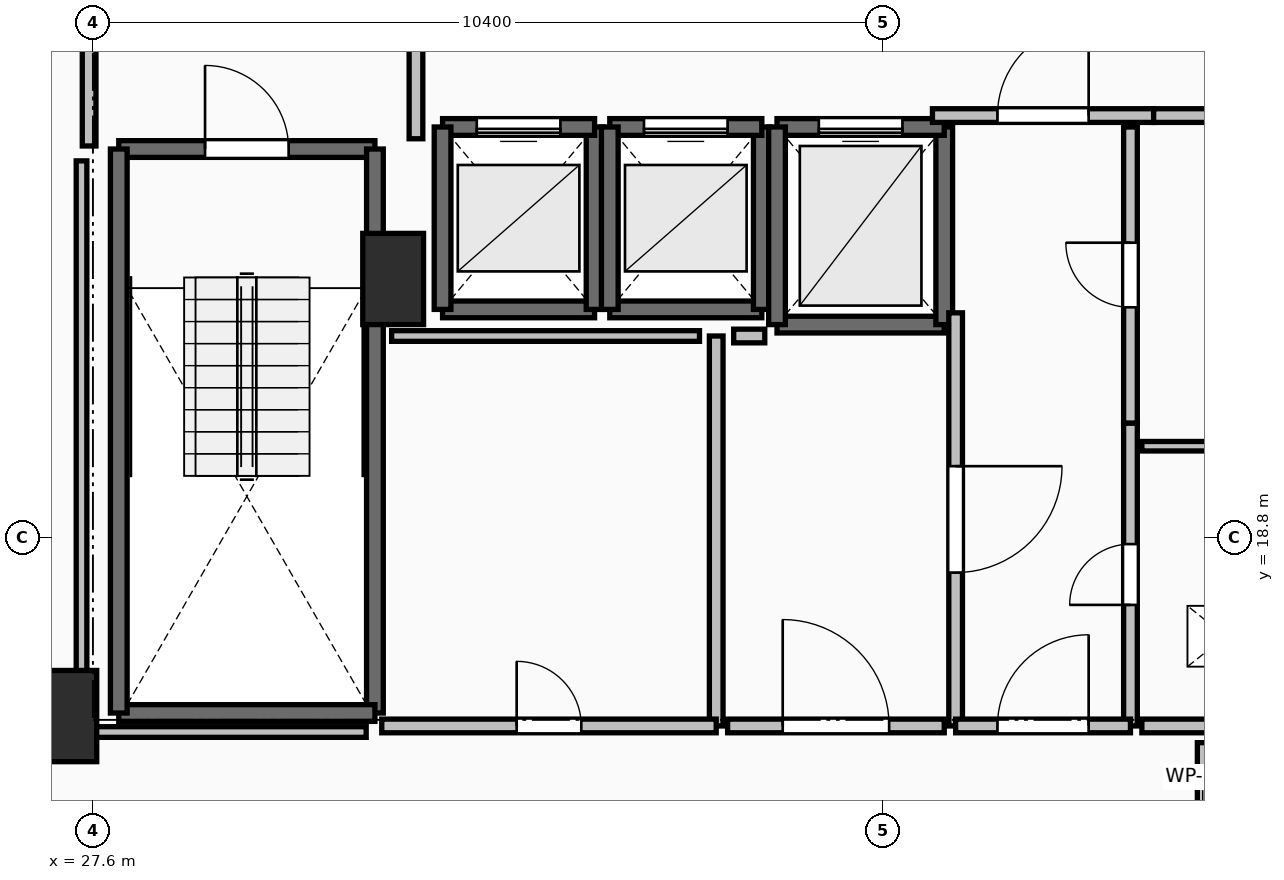
"""IFC4 building model, lengths in metres.
Left out: names, types, materials, properties, quantities, classifications, styles, units other than length and angle.
Written with IfcOpenShell. Run it as: python <this file> out.ifc"""

import sys

from ifc_helpers import new_model, si_unit, direction, frame, frame_2d, origin, origin_2d, place, context, subcontext, project, spatial, rectangle, extrude, element, fill, save


model = new_model("IFC4")
c1 = context("Model", 3, precision=1e-05, world=origin(), true_north=direction((0.0, 1.0)))
c2 = subcontext(c1, "Body", "Model", "MODEL_VIEW")
j1 = project(units=[si_unit("LENGTHUNIT", "METRE"), si_unit("PLANEANGLEUNIT", "RADIAN")], contexts=[c1])
p1 = place(None, origin())
s1 = spatial("IfcSite", under=j1, at=p1, CompositionType="ELEMENT")
p2 = place(p1, origin())
s2 = spatial("IfcBuilding", under=s1, at=p2, CompositionType="ELEMENT")
p3 = place(p2, frame((0.0, 0.0, 167.6)))
s3 = spatial("IfcBuildingStorey", under=s2, at=p3, CompositionType="ELEMENT", Elevation=167.6)
for number, where, z_axis, x_axis in (
    (1, (27.25, 16.45, 0.0), (0.0, 0.0, 1.0), (1.0, 0.0, 0.0)),
    (2, (31.55, 22.2, 0.0), (0.0, 0.0, 1.0), (1.0, 0.0, 0.0)),
):
    element("IfcColumn", number, at=place(p3, frame(where, z_axis=z_axis, x_axis=x_axis)), inside=s3, PredefinedType="PILASTER", context=c2, shape_type="SweptSolid", body=[
        extrude(rectangle(XDim=0.8, YDim=1.2, at=origin_2d()), origin(), (0.0, 0.0, 1.0), 3.5),
    ])
p4 = place(p3, frame((27.94, 23.91, 0.0), z_axis=(0.0, 0.0, 1.0), x_axis=(1.0, 0.0, 0.0)))
e3 = element("IfcWall", 3, at=p4, inside=s3, PredefinedType="SOLIDWALL", context=c2, shape_type="SweptSolid", body=[
    extrude(rectangle(XDim=3.37, YDim=0.22, at=frame_2d((1.685, 0.0))), origin(), (0.0, 0.0, 1.0), 3.24),
])
p5 = place(p4, frame((1.135, 0.0, 0.0)))
e4 = element("IfcOpeningElement", 4, at=p5, cuts=e3, PredefinedType="OPENING", context=c2, shape_type="SweptSolid", body=[
    extrude(rectangle(XDim=1.1, YDim=2.15, at=frame_2d((0.55, 1.075))), frame((0.0, 0.125, 0.0), z_axis=(0.0, -1.0, 0.0), x_axis=(1.0, 0.0, 0.0)), (0.0, 0.0, 1.0), 0.25),
])
p6 = place(p3, frame((31.31, 23.91, 0.0), z_axis=(0.0, 0.0, 1.0), x_axis=(0.0, -1.0, 0.0)))
e5 = element("IfcWall", 5, at=p6, inside=s3, PredefinedType="SOLIDWALL", context=c2, shape_type="SweptSolid", body=[
    extrude(rectangle(XDim=7.42, YDim=0.22, at=frame_2d((3.71, 0.0))), origin(), (0.0, 0.0, 1.0), 3.24),
])
p7 = place(p3, frame((31.31, 16.49, 0.0), z_axis=(0.0, 0.0, 1.0), x_axis=(-1.0, 0.0, 0.0)))
e6 = element("IfcWall", 6, at=p7, inside=s3, PredefinedType="SOLIDWALL", context=c2, shape_type="SweptSolid", body=[
    extrude(rectangle(XDim=3.37, YDim=0.22, at=frame_2d((1.685, 0.0))), origin(), (0.0, 0.0, 1.0), 3.24),
])
p8 = place(p3, frame((27.94, 16.49, 0.0), z_axis=(0.0, 0.0, 1.0), x_axis=(0.0, 1.0, 0.0)))
e7 = element("IfcWall", 7, at=p8, inside=s3, PredefinedType="SOLIDWALL", context=c2, shape_type="SweptSolid", body=[
    extrude(rectangle(XDim=7.42, YDim=0.22, at=frame_2d((3.71, 0.0))), origin(), (0.0, 0.0, 1.0), 3.24),
])
p9 = place(p3, frame((32.2, 21.8, 0.0), z_axis=(0.0, 0.0, 1.0), x_axis=(1.0, 0.0, 0.0)))
e8 = element("IfcWall", 8, at=p9, inside=s3, PredefinedType="SOLIDWALL", context=c2, shape_type="SweptSolid", body=[
    extrude(rectangle(XDim=2.0, YDim=0.22, at=frame_2d((1.0, 0.0))), origin(), (0.0, 0.0, 1.0), 3.24),
])
p10 = place(p3, frame((34.2, 21.8, 0.0), z_axis=(0.0, 0.0, 1.0), x_axis=(0.0, 1.0, 0.0)))
e9 = element("IfcWall", 9, at=p10, inside=s3, PredefinedType="SOLIDWALL", context=c2, shape_type="SweptSolid", body=[
    extrude(rectangle(XDim=2.4, YDim=0.22, at=frame_2d((1.2, 0.0))), origin(), (0.0, 0.0, 1.0), 3.24),
])
p11 = place(p3, frame((34.2, 24.2, 0.0), z_axis=(0.0, 0.0, 1.0), x_axis=(-1.0, 0.0, 0.0)))
e10 = element("IfcWall", 10, at=p11, inside=s3, PredefinedType="SOLIDWALL", context=c2, shape_type="SweptSolid", body=[
    extrude(rectangle(XDim=2.0, YDim=0.22, at=frame_2d((1.0, 0.0))), origin(), (0.0, 0.0, 1.0), 3.24),
])
p12 = place(p11, frame((0.45, 0.0, 0.0)))
e11 = element("IfcOpeningElement", 11, at=p12, cuts=e10, PredefinedType="OPENING", context=c2, shape_type="SweptSolid", body=[
    extrude(rectangle(XDim=1.1, YDim=2.2, at=frame_2d((0.55, 1.1))), frame((0.0, 0.125, 0.0), z_axis=(0.0, -1.0, 0.0), x_axis=(1.0, 0.0, 0.0)), (0.0, 0.0, 1.0), 0.25),
])
p13 = place(p3, frame((32.2, 24.2, 0.0), z_axis=(0.0, 0.0, 1.0), x_axis=(0.0, -1.0, 0.0)))
e12 = element("IfcWall", 12, at=p13, inside=s3, PredefinedType="SOLIDWALL", context=c2, shape_type="SweptSolid", body=[
    extrude(rectangle(XDim=2.4, YDim=0.22, at=frame_2d((1.2, 0.0))), origin(), (0.0, 0.0, 1.0), 3.24),
])
p14 = place(p3, frame((34.4, 21.8, 0.0), z_axis=(0.0, 0.0, 1.0), x_axis=(1.0, 0.0, 0.0)))
e13 = element("IfcWall", 13, at=p14, inside=s3, PredefinedType="SOLIDWALL", context=c2, shape_type="SweptSolid", body=[
    extrude(rectangle(XDim=2.0, YDim=0.22, at=frame_2d((1.0, 0.0))), origin(), (0.0, 0.0, 1.0), 3.24),
])
p15 = place(p3, frame((36.4, 21.8, 0.0), z_axis=(0.0, 0.0, 1.0), x_axis=(0.0, 1.0, 0.0)))
e14 = element("IfcWall", 14, at=p15, inside=s3, PredefinedType="SOLIDWALL", context=c2, shape_type="SweptSolid", body=[
    extrude(rectangle(XDim=2.4, YDim=0.22, at=frame_2d((1.2, 0.0))), origin(), (0.0, 0.0, 1.0), 3.24),
])
p16 = place(p3, frame((36.4, 24.2, 0.0), z_axis=(0.0, 0.0, 1.0), x_axis=(-1.0, 0.0, 0.0)))
e15 = element("IfcWall", 15, at=p16, inside=s3, PredefinedType="SOLIDWALL", context=c2, shape_type="SweptSolid", body=[
    extrude(rectangle(XDim=2.0, YDim=0.22, at=frame_2d((1.0, 0.0))), origin(), (0.0, 0.0, 1.0), 3.24),
])
p17 = place(p16, frame((0.45, 0.0, 0.0)))
e16 = element("IfcOpeningElement", 16, at=p17, cuts=e15, PredefinedType="OPENING", context=c2, shape_type="SweptSolid", body=[
    extrude(rectangle(XDim=1.1, YDim=2.2, at=frame_2d((0.55, 1.1))), frame((0.0, 0.125, 0.0), z_axis=(0.0, -1.0, 0.0), x_axis=(1.0, 0.0, 0.0)), (0.0, 0.0, 1.0), 0.25),
])
p18 = place(p3, frame((34.4, 24.2, 0.0), z_axis=(0.0, 0.0, 1.0), x_axis=(0.0, -1.0, 0.0)))
e17 = element("IfcWall", 17, at=p18, inside=s3, PredefinedType="SOLIDWALL", context=c2, shape_type="SweptSolid", body=[
    extrude(rectangle(XDim=2.4, YDim=0.22, at=frame_2d((1.2, 0.0))), origin(), (0.0, 0.0, 1.0), 3.24),
])
p19 = place(p3, frame((36.6, 21.6, 0.0), z_axis=(0.0, 0.0, 1.0), x_axis=(1.0, 0.0, 0.0)))
e18 = element("IfcWall", 18, at=p19, inside=s3, PredefinedType="SOLIDWALL", context=c2, shape_type="SweptSolid", body=[
    extrude(rectangle(XDim=2.2, YDim=0.22, at=frame_2d((1.1, 0.0))), origin(), (0.0, 0.0, 1.0), 3.24),
])
p20 = place(p3, frame((38.8, 21.6, 0.0), z_axis=(0.0, 0.0, 1.0), x_axis=(0.0, 1.0, 0.0)))
e19 = element("IfcWall", 19, at=p20, inside=s3, PredefinedType="SOLIDWALL", context=c2, shape_type="SweptSolid", body=[
    extrude(rectangle(XDim=2.6, YDim=0.22, at=frame_2d((1.3, 0.0))), origin(), (0.0, 0.0, 1.0), 3.24),
])
p21 = place(p3, frame((38.8, 24.2, 0.0), z_axis=(0.0, 0.0, 1.0), x_axis=(-1.0, 0.0, 0.0)))
e20 = element("IfcWall", 20, at=p21, inside=s3, PredefinedType="SOLIDWALL", context=c2, shape_type="SweptSolid", body=[
    extrude(rectangle(XDim=2.2, YDim=0.22, at=frame_2d((1.1, 0.0))), origin(), (0.0, 0.0, 1.0), 3.24),
])
p22 = place(p21, frame((0.55, 0.0, 0.0)))
e21 = element("IfcOpeningElement", 21, at=p22, cuts=e20, PredefinedType="OPENING", context=c2, shape_type="SweptSolid", body=[
    extrude(rectangle(XDim=1.1, YDim=2.2, at=frame_2d((0.55, 1.1))), frame((0.0, 0.125, 0.0), z_axis=(0.0, -1.0, 0.0), x_axis=(1.0, 0.0, 0.0)), (0.0, 0.0, 1.0), 0.25),
])
p23 = place(p3, frame((36.6, 24.2, 0.0), z_axis=(0.0, 0.0, 1.0), x_axis=(0.0, -1.0, 0.0)))
e22 = element("IfcWall", 22, at=p23, inside=s3, PredefinedType="SOLIDWALL", context=c2, shape_type="SweptSolid", body=[
    extrude(rectangle(XDim=2.6, YDim=0.22, at=frame_2d((1.3, 0.0))), origin(), (0.0, 0.0, 1.0), 3.24),
])
p24 = place(p3, frame((31.85, 24.045, 0.0), z_axis=(0.0, 0.0, 1.0), x_axis=(0.0, 1.0, 0.0)))
e23 = element("IfcWall", 23, at=p24, inside=s3, PredefinedType="PARTITIONING", context=c2, shape_type="SweptSolid", body=[
    extrude(rectangle(XDim=3.91, YDim=0.18, at=frame_2d((1.955, 0.0))), origin(), (0.0, 0.0, 1.0), 3.24),
])
p25 = place(p24, frame((1.355, 0.0, 0.0)))
e24 = element("IfcOpeningElement", 24, at=p25, cuts=e23, PredefinedType="OPENING", context=c2, shape_type="SweptSolid", body=[
    extrude(rectangle(XDim=1.2, YDim=2.15, at=frame_2d((0.6, 1.075))), frame((0.0, 0.105, 0.0), z_axis=(0.0, -1.0, 0.0), x_axis=(1.0, 0.0, 0.0)), (0.0, 0.0, 1.0), 0.21),
])
p26 = place(p3, frame((27.55, 28.0, 0.0), z_axis=(0.0, 0.0, 1.0), x_axis=(0.0, -1.0, 0.0)))
e25 = element("IfcWall", 25, at=p26, inside=s3, PredefinedType="PARTITIONING", context=c2, shape_type="SweptSolid", body=[
    extrude(rectangle(XDim=4.05, YDim=0.18, at=frame_2d((2.025, 0.0))), origin(), (0.0, 0.0, 1.0), 3.24),
])
p27 = place(p26, frame((1.425, 0.0, 0.0)))
e26 = element("IfcOpeningElement", 26, at=p27, cuts=e25, PredefinedType="OPENING", context=c2, shape_type="SweptSolid", body=[
    extrude(rectangle(XDim=1.2, YDim=2.15, at=frame_2d((0.6, 1.075))), frame((0.0, 0.105, 0.0), z_axis=(0.0, -1.0, 0.0), x_axis=(1.0, 0.0, 0.0)), (0.0, 0.0, 1.0), 0.21),
])
p28 = place(p3, frame((38.645, 24.35, 0.0), z_axis=(0.0, 0.0, 1.0), x_axis=(1.0, 0.0, 0.0)))
e27 = element("IfcWall", 27, at=p28, inside=s3, PredefinedType="PARTITIONING", context=c2, shape_type="SweptSolid", body=[
    extrude(rectangle(XDim=2.91, YDim=0.18, at=frame_2d((1.455, 0.0))), origin(), (0.0, 0.0, 1.0), 3.24),
])
p29 = place(p28, frame((0.855, 0.0, 0.0)))
e28 = element("IfcOpeningElement", 28, at=p29, cuts=e27, PredefinedType="OPENING", context=c2, shape_type="SweptSolid", body=[
    extrude(rectangle(XDim=1.2, YDim=2.15, at=frame_2d((0.6, 1.075))), frame((0.0, 0.105, 0.0), z_axis=(0.0, -1.0, 0.0), x_axis=(1.0, 0.0, 0.0)), (0.0, 0.0, 1.0), 0.21),
])
p30 = place(p3, frame((41.555, 24.35, 0.0), z_axis=(0.0, 0.0, 1.0), x_axis=(1.0, 0.0, 0.0)))
e29 = element("IfcWall", 29, at=p30, inside=s3, PredefinedType="PARTITIONING", context=c2, shape_type="SweptSolid", body=[
    extrude(rectangle(XDim=2.445, YDim=0.18, at=frame_2d((1.223, 0.0))), origin(), (0.0, 0.0, 1.0), 3.24),
])
p31 = place(p30, frame((0.798, 0.0, 0.0)))
e30 = element("IfcOpeningElement", 30, at=p31, cuts=e29, PredefinedType="OPENING", context=c2, shape_type="SweptSolid", body=[
    extrude(rectangle(XDim=0.85, YDim=2.1, at=frame_2d((0.425, 1.05))), frame((0.0, 0.105, 0.0), z_axis=(0.0, -1.0, 0.0), x_axis=(1.0, 0.0, 0.0)), (0.0, 0.0, 1.0), 0.21),
])
p32 = place(p3, frame((41.25, 16.32, 0.0), z_axis=(0.0, 0.0, 1.0), x_axis=(0.0, 1.0, 0.0)))
e31 = element("IfcWall", 31, at=p32, inside=s3, PredefinedType="PARTITIONING", context=c2, shape_type="SweptSolid", body=[
    extrude(rectangle(XDim=3.985, YDim=0.18, at=frame_2d((1.992, 0.0))), origin(), (0.0, 0.0, 1.0), 3.24),
])
p33 = place(p32, frame((1.593, 0.0, 0.0)))
e32 = element("IfcOpeningElement", 32, at=p33, cuts=e31, PredefinedType="OPENING", context=c2, shape_type="SweptSolid", body=[
    extrude(rectangle(XDim=0.8, YDim=2.05, at=frame_2d((0.4, 1.025))), frame((0.0, 0.105, 0.0), z_axis=(0.0, -1.0, 0.0), x_axis=(1.0, 0.0, 0.0)), (0.0, 0.0, 1.0), 0.21),
])
p34 = place(p3, frame((41.25, 20.305, 0.0), z_axis=(0.0, 0.0, 1.0), x_axis=(0.0, 1.0, 0.0)))
e33 = element("IfcWall", 33, at=p34, inside=s3, PredefinedType="PARTITIONING", context=c2, shape_type="SweptSolid", body=[
    extrude(rectangle(XDim=3.895, YDim=0.18, at=frame_2d((1.948, 0.0))), origin(), (0.0, 0.0, 1.0), 3.24),
])
p35 = place(p34, frame((1.522, 0.0, 0.0)))
e34 = element("IfcOpeningElement", 34, at=p35, cuts=e33, PredefinedType="OPENING", context=c2, shape_type="SweptSolid", body=[
    extrude(rectangle(XDim=0.85, YDim=2.1, at=frame_2d((0.425, 1.05))), frame((0.0, 0.105, 0.0), z_axis=(0.0, -1.0, 0.0), x_axis=(1.0, 0.0, 0.0)), (0.0, 0.0, 1.0), 0.21),
])
p36 = place(p3, frame((38.95, 21.755, 0.0), z_axis=(0.0, 0.0, 1.0), x_axis=(0.0, -1.0, 0.0)))
e35 = element("IfcWall", 35, at=p36, inside=s3, PredefinedType="PARTITIONING", context=c2, shape_type="SweptSolid", body=[
    extrude(rectangle(XDim=5.435, YDim=0.18, at=frame_2d((2.717, 0.0))), origin(), (0.0, 0.0, 1.0), 3.24),
])
p37 = place(p36, frame((2.018, 0.0, 0.0)))
e36 = element("IfcOpeningElement", 36, at=p37, cuts=e35, PredefinedType="OPENING", context=c2, shape_type="SweptSolid", body=[
    extrude(rectangle(XDim=1.4, YDim=2.2, at=frame_2d((0.7, 1.1))), frame((0.0, 0.105, 0.0), z_axis=(0.0, -1.0, 0.0), x_axis=(1.0, 0.0, 0.0)), (0.0, 0.0, 1.0), 0.21),
])
p38 = place(p3, frame((38.95, 16.32, 0.0), z_axis=(0.0, 0.0, 1.0), x_axis=(1.0, 0.0, 0.0)))
e37 = element("IfcWall", 37, at=p38, inside=s3, PredefinedType="PARTITIONING", context=c2, shape_type="SweptSolid", body=[
    extrude(rectangle(XDim=2.3, YDim=0.18, at=frame_2d((1.15, 0.0))), origin(), (0.0, 0.0, 1.0), 3.24),
])
p39 = place(p38, frame((0.55, 0.0, 0.0)))
e38 = element("IfcOpeningElement", 38, at=p39, cuts=e37, PredefinedType="OPENING", context=c2, shape_type="SweptSolid", body=[
    extrude(rectangle(XDim=1.2, YDim=2.15, at=frame_2d((0.6, 1.075))), frame((0.0, 0.105, 0.0), z_axis=(0.0, -1.0, 0.0), x_axis=(1.0, 0.0, 0.0)), (0.0, 0.0, 1.0), 0.21),
])
p40 = place(p3, frame((44.6, 20.0, 0.0), z_axis=(0.0, 0.0, 1.0), x_axis=(-1.0, 0.0, 0.0)))
e39 = element("IfcWall", 39, at=p40, inside=s3, PredefinedType="PARTITIONING", context=c2, shape_type="SweptSolid", body=[
    extrude(rectangle(XDim=3.2, YDim=0.125, at=frame_2d((1.6, 0.0))), origin(), (0.0, 0.0, 1.0), 3.24),
])
p41 = place(p3, frame((41.4, 16.32, 0.0), z_axis=(0.0, 0.0, 1.0), x_axis=(1.0, 0.0, 0.0)))
e40 = element("IfcWall", 40, at=p41, inside=s3, PredefinedType="PARTITIONING", context=c2, shape_type="SweptSolid", body=[
    extrude(rectangle(XDim=3.2, YDim=0.18, at=frame_2d((1.6, 0.0))), origin(), (0.0, 0.0, 1.0), 3.24),
])
p42 = place(p41, frame((1.2, 0.0, 0.0)))
e41 = element("IfcOpeningElement", 41, at=p42, cuts=e40, PredefinedType="OPENING", context=c2, shape_type="SweptSolid", body=[
    extrude(rectangle(XDim=0.8, YDim=2.05, at=frame_2d((0.4, 1.025))), frame((0.0, 0.105, 0.0), z_axis=(0.0, -1.0, 0.0), x_axis=(1.0, 0.0, 0.0)), (0.0, 0.0, 1.0), 0.21),
])
p43 = place(p3, frame((35.8, 16.32, 0.0), z_axis=(0.0, 0.0, 1.0), x_axis=(0.0, 1.0, 0.0)))
e42 = element("IfcWall", 42, at=p43, inside=s3, PredefinedType="PARTITIONING", context=c2, shape_type="SweptSolid", body=[
    extrude(rectangle(XDim=5.13, YDim=0.18, at=frame_2d((2.565, 0.0))), origin(), (0.0, 0.0, 1.0), 3.24),
])
p44 = place(p3, frame((31.4, 16.32, 0.0), z_axis=(0.0, 0.0, 1.0), x_axis=(1.0, 0.0, 0.0)))
e43 = element("IfcWall", 43, at=p44, inside=s3, PredefinedType="PARTITIONING", context=c2, shape_type="SweptSolid", body=[
    extrude(rectangle(XDim=4.4, YDim=0.18, at=frame_2d((2.2, 0.0))), origin(), (0.0, 0.0, 1.0), 3.24),
])
p45 = place(p44, frame((1.775, 0.0, 0.0)))
e44 = element("IfcOpeningElement", 44, at=p45, cuts=e43, PredefinedType="OPENING", context=c2, shape_type="SweptSolid", body=[
    extrude(rectangle(XDim=0.85, YDim=2.1, at=frame_2d((0.425, 1.05))), frame((0.0, 0.105, 0.0), z_axis=(0.0, -1.0, 0.0), x_axis=(1.0, 0.0, 0.0)), (0.0, 0.0, 1.0), 0.21),
])
p46 = place(p3, frame((35.95, 16.32, 0.0), z_axis=(0.0, 0.0, 1.0), x_axis=(1.0, 0.0, 0.0)))
e45 = element("IfcWall", 45, at=p46, inside=s3, PredefinedType="PARTITIONING", context=c2, shape_type="SweptSolid", body=[
    extrude(rectangle(XDim=2.85, YDim=0.18, at=frame_2d((1.425, 0.0))), origin(), (0.0, 0.0, 1.0), 3.24),
])
p47 = place(p46, frame((0.725, 0.0, 0.0)))
e46 = element("IfcOpeningElement", 46, at=p47, cuts=e45, PredefinedType="OPENING", context=c2, shape_type="SweptSolid", body=[
    extrude(rectangle(XDim=1.4, YDim=2.2, at=frame_2d((0.7, 1.1))), frame((0.0, 0.105, 0.0), z_axis=(0.0, -1.0, 0.0), x_axis=(1.0, 0.0, 0.0)), (0.0, 0.0, 1.0), 0.21),
])
p48 = place(p3, frame((35.58, 21.45, 0.0), z_axis=(0.0, 0.0, 1.0), x_axis=(-1.0, 0.0, 0.0)))
e47 = element("IfcWall", 47, at=p48, inside=s3, PredefinedType="PARTITIONING", context=c2, shape_type="SweptSolid", body=[
    extrude(rectangle(XDim=4.05, YDim=0.14, at=frame_2d((2.025, 0.0))), origin(), (0.0, 0.0, 1.0), 3.24),
])
p49 = place(p3, frame((36.439, 21.45, 0.0), z_axis=(0.0, 0.0, 1.0), x_axis=(-1.0, 0.0, 0.0)))
e48 = element("IfcWall", 48, at=p49, inside=s3, PredefinedType="PARTITIONING", context=c2, shape_type="SweptSolid", body=[
    extrude(rectangle(XDim=0.409, YDim=0.18, at=frame_2d((0.205, 0.0))), origin(), (0.0, 0.0, 1.0), 3.24),
])
p50 = place(p3, frame((27.45, 23.754, 0.0), z_axis=(0.0, 0.0, 1.0), x_axis=(0.0, -1.0, 0.0)))
e49 = element("IfcWall", 49, at=p50, inside=s3, PredefinedType="PARTITIONING", context=c2, shape_type="SweptSolid", body=[
    extrude(rectangle(XDim=7.514, YDim=0.14, at=frame_2d((3.757, 0.0))), origin(), (0.0, 0.0, 1.0), 2.432),
])
p51 = place(p3, frame((27.45, 16.24, 0.0), z_axis=(0.0, 0.0, 1.0), x_axis=(1.0, 0.0, 0.0)))
e50 = element("IfcWall", 50, at=p51, inside=s3, PredefinedType="PARTITIONING", context=c2, shape_type="SweptSolid", body=[
    extrude(rectangle(XDim=3.745, YDim=0.14, at=frame_2d((1.873, 0.0))), origin(), (0.0, 0.0, 1.0), 2.432),
])
p52 = place(p3, frame((42.2, 16.1, 0.0), z_axis=(0.0, 0.0, 1.0), x_axis=(0.0, -1.0, 0.0)))
e51 = element("IfcWall", 51, at=p52, inside=s3, PredefinedType="PARTITIONING", context=c2, shape_type="SweptSolid", body=[
    extrude(rectangle(XDim=1.83, YDim=0.14, at=frame_2d((0.915, 0.0))), origin(), (0.0, 0.0, 1.0), 3.24),
])
p53 = place(p5, origin())
e52 = element("IfcDoor", 52, at=p53, inside=s3, OperationType="SINGLE_SWING_LEFT", PredefinedType="DOOR", context=c2, shape_type="SweptSolid", body=[
    extrude(rectangle(XDim=1.1, YDim=2.15, at=frame_2d((0.55, 1.075))), frame((0.0, 0.025, 0.0), z_axis=(0.0, -1.0, 0.0), x_axis=(1.0, 0.0, 0.0)), (0.0, 0.0, 1.0), 0.05),
])
fill(e4, e52)
p54 = place(p12, origin())
e53 = element("IfcDoor", 53, at=p54, inside=s3, OperationType="SLIDING_TO_LEFT", PredefinedType="DOOR", context=c2, shape_type="SweptSolid", body=[
    extrude(rectangle(XDim=1.1, YDim=2.2, at=frame_2d((0.55, 1.1))), frame((0.0, 0.025, 0.0), z_axis=(0.0, -1.0, 0.0), x_axis=(1.0, 0.0, 0.0)), (0.0, 0.0, 1.0), 0.05),
])
fill(e11, e53)
p55 = place(p17, origin())
e54 = element("IfcDoor", 54, at=p55, inside=s3, OperationType="SLIDING_TO_LEFT", PredefinedType="DOOR", context=c2, shape_type="SweptSolid", body=[
    extrude(rectangle(XDim=1.1, YDim=2.2, at=frame_2d((0.55, 1.1))), frame((0.0, 0.025, 0.0), z_axis=(0.0, -1.0, 0.0), x_axis=(1.0, 0.0, 0.0)), (0.0, 0.0, 1.0), 0.05),
])
fill(e16, e54)
p56 = place(p22, origin())
e55 = element("IfcDoor", 55, at=p56, inside=s3, OperationType="SLIDING_TO_LEFT", PredefinedType="DOOR", context=c2, shape_type="SweptSolid", body=[
    extrude(rectangle(XDim=1.1, YDim=2.2, at=frame_2d((0.55, 1.1))), frame((0.0, 0.025, 0.0), z_axis=(0.0, -1.0, 0.0), x_axis=(1.0, 0.0, 0.0)), (0.0, 0.0, 1.0), 0.05),
])
fill(e21, e55)
p57 = place(p29, origin())
e56 = element("IfcDoor", 56, at=p57, inside=s3, OperationType="SINGLE_SWING_RIGHT", PredefinedType="DOOR", context=c2, shape_type="SweptSolid", body=[
    extrude(rectangle(XDim=1.2, YDim=2.15, at=frame_2d((0.6, 1.075))), frame((0.0, 0.025, 0.0), z_axis=(0.0, -1.0, 0.0), x_axis=(1.0, 0.0, 0.0)), (0.0, 0.0, 1.0), 0.05),
])
fill(e28, e56)
p58 = place(p33, origin())
e57 = element("IfcDoor", 57, at=p58, inside=s3, OperationType="SINGLE_SWING_LEFT", PredefinedType="DOOR", context=c2, shape_type="SweptSolid", body=[
    extrude(rectangle(XDim=0.8, YDim=2.05, at=frame_2d((0.4, 1.025))), frame((0.0, 0.025, 0.0), z_axis=(0.0, -1.0, 0.0), x_axis=(1.0, 0.0, 0.0)), (0.0, 0.0, 1.0), 0.05),
])
fill(e32, e57)
p59 = place(p35, origin())
e58 = element("IfcDoor", 58, at=p59, inside=s3, OperationType="SINGLE_SWING_RIGHT", PredefinedType="DOOR", context=c2, shape_type="SweptSolid", body=[
    extrude(rectangle(XDim=0.85, YDim=2.1, at=frame_2d((0.425, 1.05))), frame((0.0, 0.025, 0.0), z_axis=(0.0, -1.0, 0.0), x_axis=(1.0, 0.0, 0.0)), (0.0, 0.0, 1.0), 0.05),
])
fill(e34, e58)
p60 = place(p37, origin())
e59 = element("IfcDoor", 59, at=p60, inside=s3, OperationType="DOUBLE_SWING_LEFT", PredefinedType="DOOR", context=c2, shape_type="SweptSolid", body=[
    extrude(rectangle(XDim=1.4, YDim=2.2, at=frame_2d((0.7, 1.1))), frame((0.0, 0.025, 0.0), z_axis=(0.0, -1.0, 0.0), x_axis=(1.0, 0.0, 0.0)), (0.0, 0.0, 1.0), 0.05),
])
fill(e36, e59)
p61 = place(p39, origin())
e60 = element("IfcDoor", 60, at=p61, inside=s3, OperationType="SINGLE_SWING_RIGHT", PredefinedType="DOOR", context=c2, shape_type="SweptSolid", body=[
    extrude(rectangle(XDim=1.2, YDim=2.15, at=frame_2d((0.6, 1.075))), frame((0.0, 0.025, 0.0), z_axis=(0.0, -1.0, 0.0), x_axis=(1.0, 0.0, 0.0)), (0.0, 0.0, 1.0), 0.05),
])
fill(e38, e60)
p62 = place(p45, origin())
e61 = element("IfcDoor", 61, at=p62, inside=s3, OperationType="SINGLE_SWING_LEFT", PredefinedType="DOOR", context=c2, shape_type="SweptSolid", body=[
    extrude(rectangle(XDim=0.85, YDim=2.1, at=frame_2d((0.425, 1.05))), frame((0.0, 0.025, 0.0), z_axis=(0.0, -1.0, 0.0), x_axis=(1.0, 0.0, 0.0)), (0.0, 0.0, 1.0), 0.05),
])
fill(e44, e61)
p63 = place(p47, origin())
e62 = element("IfcDoor", 62, at=p63, inside=s3, OperationType="DOUBLE_SWING_LEFT", PredefinedType="DOOR", context=c2, shape_type="SweptSolid", body=[
    extrude(rectangle(XDim=1.4, YDim=2.2, at=frame_2d((0.7, 1.1))), frame((0.0, 0.025, 0.0), z_axis=(0.0, -1.0, 0.0), x_axis=(1.0, 0.0, 0.0)), (0.0, 0.0, 1.0), 0.05),
])
fill(e46, e62)
save(model, sys.argv[1])
